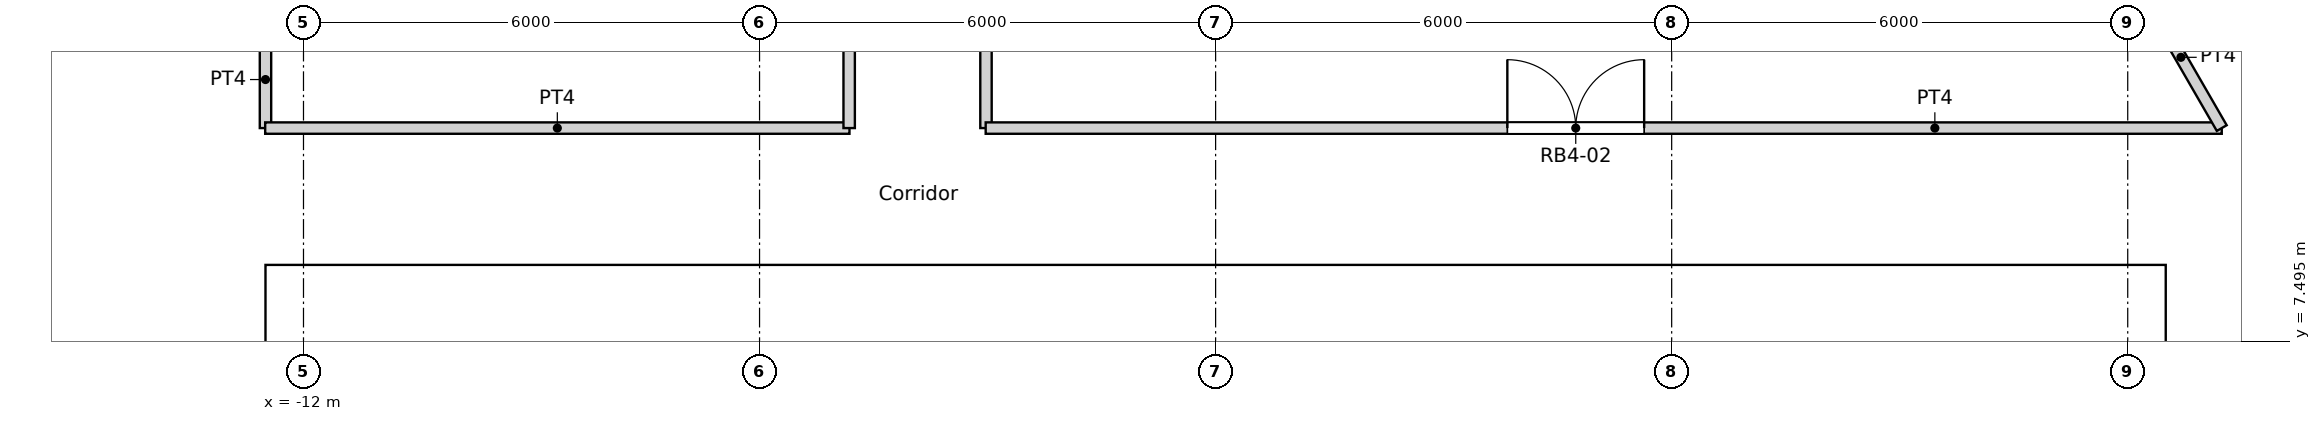
"""IFC4 building model, lengths in metres.
Left out: names, types, materials, properties, quantities, classifications, styles, units other than length and angle.
Written with IfcOpenShell. Run it as: python <this file> out.ifc"""

import sys

from ifc_helpers import new_model, si_unit, direction, frame, frame_2d, origin, place, context, subcontext, project, spatial, rectangle, extrude, element, fill, save


model = new_model("IFC4")
c1 = context("Model", 3, precision=1e-05, world=origin(), true_north=direction((0.0, 1.0)))
c2 = subcontext(c1, "Body", "Model", "MODEL_VIEW")
j1 = project(units=[si_unit("LENGTHUNIT", "METRE"), si_unit("PLANEANGLEUNIT", "RADIAN")], contexts=[c1])
p1 = place(None, origin())
s1 = spatial("IfcSite", under=j1, at=p1, CompositionType="ELEMENT")
p2 = place(p1, origin())
s2 = spatial("IfcBuilding", under=s1, at=p2, CompositionType="ELEMENT")
p3 = place(p2, frame((0.0, 0.0, 158.4)))
s3 = spatial("IfcBuildingStorey", under=s2, at=p3, CompositionType="ELEMENT", Elevation=158.4)
p4 = place(p3, frame((-12.5, 8.05, 0.0), z_axis=(0.0, 0.0, 1.0), x_axis=(1.0, 0.0, 0.0)))
e1 = element("IfcWall", 1, at=p4, inside=s3, PredefinedType="SOLIDWALL", context=c2, shape_type="SweptSolid", body=[
    extrude(rectangle(XDim=25.0, YDim=0.9, at=frame_2d((12.5, 0.0))), origin(), (0.0, 0.0, 1.0), 3.6),
])
p5 = place(p4, frame((8.3, 0.0, 0.0)))
e2 = element("IfcOpeningElement", 2, at=p5, cuts=e1, PredefinedType="OPENING", context=c2, shape_type="SweptSolid", body=[
    extrude(rectangle(XDim=1.8, YDim=2.1, at=frame_2d((0.9, 1.05))), frame((0.0, 0.45, 0.0), z_axis=(0.0, -1.0, 0.0), x_axis=(1.0, 0.0, 0.0)), (0.0, 0.0, 1.0), 0.9),
])
p6 = place(p3, frame((-12.05, -7.6, 0.0), z_axis=(0.0, 0.0, 1.0), x_axis=(0.0, 1.0, 0.0)))
e3 = element("IfcWall", 3, at=p6, inside=s3, PredefinedType="SOLIDWALL", context=c2, shape_type="SweptSolid", body=[
    extrude(rectangle(XDim=15.2, YDim=0.9, at=frame_2d((7.6, 0.0))), origin(), (0.0, 0.0, 1.0), 3.6),
])
p7 = place(p6, frame((7.1, 0.0, 0.0)))
e4 = element("IfcOpeningElement", 4, at=p7, cuts=e3, PredefinedType="OPENING", context=c2, shape_type="SweptSolid", body=[
    extrude(rectangle(XDim=1.0, YDim=2.1, at=frame_2d((0.5, 1.05))), frame((0.0, 0.45, 0.0), z_axis=(0.0, -1.0, 0.0), x_axis=(1.0, 0.0, 0.0)), (0.0, 0.0, 1.0), 0.9),
])
p8 = place(p3, frame((12.05, -7.6, 0.0), z_axis=(0.0, 0.0, 1.0), x_axis=(0.0, 1.0, 0.0)))
e5 = element("IfcWall", 5, at=p8, inside=s3, PredefinedType="SOLIDWALL", context=c2, shape_type="SweptSolid", body=[
    extrude(rectangle(XDim=15.2, YDim=0.9, at=frame_2d((7.6, 0.0))), origin(), (0.0, 0.0, 1.0), 3.6),
])
p9 = place(p8, frame((5.1, 0.0, 0.0)))
e6 = element("IfcOpeningElement", 6, at=p9, cuts=e5, PredefinedType="OPENING", context=c2, shape_type="SweptSolid", body=[
    extrude(rectangle(XDim=1.0, YDim=2.1, at=frame_2d((0.5, 1.05))), frame((0.0, 0.45, 0.0), z_axis=(0.0, -1.0, 0.0), x_axis=(1.0, 0.0, 0.0)), (0.0, 0.0, 1.0), 0.9),
])
for number, where, z_axis, x_axis in (
    (7, (-2.25, 3.25, 0.0), (0.0, 0.0, 1.0), (0.0, 1.0, 0.0)),
    (8, (0.55, 3.25, 0.0), (0.0, 0.0, 1.0), (0.0, 1.0, 0.0)),
):
    element("IfcWall", number, at=place(p3, frame(where, z_axis=z_axis, x_axis=x_axis)), inside=s3, PredefinedType="SOLIDWALL", context=c2, shape_type="SweptSolid", body=[
        extrude(rectangle(XDim=4.35, YDim=0.3, at=frame_2d((2.175, 0.0))), origin(), (0.0, 0.0, 1.0), 3.3),
    ])
p10 = place(p3, frame((-9.05, -7.0, 0.0), z_axis=(0.0, 0.0, 1.0), x_axis=(0.0, 1.0, 0.0)))
e9 = element("IfcWall", 9, at=p10, inside=s3, PredefinedType="SOLIDWALL", context=c2, shape_type="SweptSolid", body=[
    extrude(rectangle(XDim=14.6, YDim=0.3, at=frame_2d((7.3, 0.0))), origin(), (0.0, 0.0, 1.0), 3.3),
])
p11 = place(p3, frame((-4.275, 6.7, 0.0), z_axis=(0.0, 0.0, 1.0), x_axis=(0.0, 1.0, 0.0)))
e10 = element("IfcWall", 10, at=p11, inside=s3, PredefinedType="SOLIDWALL", context=c2, shape_type="SweptSolid", body=[
    extrude(rectangle(XDim=0.9, YDim=0.15, at=frame_2d((0.45, 0.0))), origin(), (0.0, 0.0, 1.0), 3.3),
])
p12 = place(p3, frame((0.7, 7.15, 0.0), z_axis=(0.0, 0.0, 1.0), x_axis=(1.0, 0.0, 0.0)))
e11 = element("IfcWall", 11, at=p12, inside=s3, PredefinedType="SOLIDWALL", context=c2, shape_type="SweptSolid", body=[
    extrude(rectangle(XDim=8.35, YDim=0.9, at=frame_2d((4.175, 0.0))), origin(), (0.0, 0.0, 1.0), 3.3),
])
p13 = place(p3, frame((-12.504, 10.3, 0.0), z_axis=(0.0, 0.0, 1.0), x_axis=(1.0, 0.0, 0.0)))
e12 = element("IfcWall", 12, at=p13, inside=s3, PredefinedType="PARTITIONING", context=c2, shape_type="SweptSolid", body=[
    extrude(rectangle(XDim=7.687, YDim=0.15, at=frame_2d((3.844, 0.0))), origin(), (0.0, 0.0, 1.0), 3.3),
])
p14 = place(p3, frame((-3.025, 10.3, 0.0), z_axis=(0.0, 0.0, 1.0), x_axis=(1.0, 0.0, 0.0)))
e13 = element("IfcWall", 13, at=p14, inside=s3, PredefinedType="PARTITIONING", context=c2, shape_type="SweptSolid", body=[
    extrude(rectangle(XDim=16.262, YDim=0.15, at=frame_2d((8.131, 0.0))), origin(), (0.0, 0.0, 1.0), 3.3),
])
p15 = place(p14, frame((6.863, 0.0, 0.0)))
e14 = element("IfcOpeningElement", 14, at=p15, cuts=e13, PredefinedType="OPENING", context=c2, shape_type="SweptSolid", body=[
    extrude(rectangle(XDim=1.8, YDim=2.1, at=frame_2d((0.9, 1.05))), frame((0.0, 0.075, 0.0), z_axis=(0.0, -1.0, 0.0), x_axis=(1.0, 0.0, 0.0)), (0.0, 0.0, 1.0), 0.15),
])
p16 = place(p3, frame((12.162, 12.162, 0.0), z_axis=(0.0, 0.0, 1.0), x_axis=(0.499961633463, -0.866047553582, 0.0)))
e15 = element("IfcWall", 15, at=p16, inside=s3, PredefinedType="PARTITIONING", context=c2, shape_type="SweptSolid", body=[
    extrude(rectangle(XDim=2.15, YDim=0.15, at=frame_2d((1.075, 0.0))), origin(), (0.0, 0.0, 1.0), 3.3),
])
p17 = place(p3, frame((-4.821, 10.3, 0.0), z_axis=(0.0, 0.0, 1.0), x_axis=(0.0, 1.0, 0.0)))
e16 = element("IfcWall", 16, at=p17, inside=s3, PredefinedType="PARTITIONING", context=c2, shape_type="SweptSolid", body=[
    extrude(rectangle(XDim=6.101, YDim=0.15, at=frame_2d((3.05, 0.0))), origin(), (0.0, 0.0, 1.0), 3.3),
])
p18 = place(p3, frame((-3.021, 10.3, 0.0), z_axis=(0.0, 0.0, 1.0), x_axis=(0.0, 1.0, 0.0)))
e17 = element("IfcWall", 17, at=p18, inside=s3, PredefinedType="PARTITIONING", context=c2, shape_type="SweptSolid", body=[
    extrude(rectangle(XDim=6.314, YDim=0.15, at=frame_2d((3.157, 0.0))), origin(), (0.0, 0.0, 1.0), 3.3),
])
p19 = place(p3, frame((-12.5, 10.3, 0.0), z_axis=(0.0, 0.0, 1.0), x_axis=(0.0, 1.0, 0.0)))
e18 = element("IfcWall", 18, at=p19, inside=s3, PredefinedType="PARTITIONING", context=c2, shape_type="SweptSolid", body=[
    extrude(rectangle(XDim=1.277, YDim=0.15, at=frame_2d((0.638, 0.0))), origin(), (0.0, 0.0, 1.0), 3.3),
])
p20 = place(p3, frame((-18.688, 6.802, 0.0), z_axis=(0.0, 0.0, 1.0), x_axis=(0.499914202267, 0.866074933462, 0.0)))
e19 = element("IfcWall", 19, at=p20, inside=s3, PredefinedType="PARTITIONING", context=c2, shape_type="SweptSolid", body=[
    extrude(rectangle(XDim=6.907, YDim=0.15, at=frame_2d((3.454, 0.0))), origin(), (0.0, 0.0, 1.0), 3.3),
])
p21 = place(p5, origin())
e20 = element("IfcDoor", 20, at=p21, inside=s3, OperationType="DOUBLE_DOOR_SINGLE_SWING", PredefinedType="DOOR", context=c2, shape_type="SweptSolid", body=[
    extrude(rectangle(XDim=1.8, YDim=2.1, at=frame_2d((0.9, 1.05))), frame((0.0, 0.025, 0.0), z_axis=(0.0, -1.0, 0.0), x_axis=(1.0, 0.0, 0.0)), (0.0, 0.0, 1.0), 0.05),
])
fill(e2, e20)
p22 = place(p15, origin())
e21 = element("IfcDoor", 21, at=p22, inside=s3, OperationType="DOUBLE_DOOR_SINGLE_SWING", PredefinedType="DOOR", context=c2, shape_type="SweptSolid", body=[
    extrude(rectangle(XDim=1.8, YDim=2.1, at=frame_2d((0.9, 1.05))), frame((0.0, 0.025, 0.0), z_axis=(0.0, -1.0, 0.0), x_axis=(1.0, 0.0, 0.0)), (0.0, 0.0, 1.0), 0.05),
])
fill(e14, e21)
save(model, sys.argv[1])
